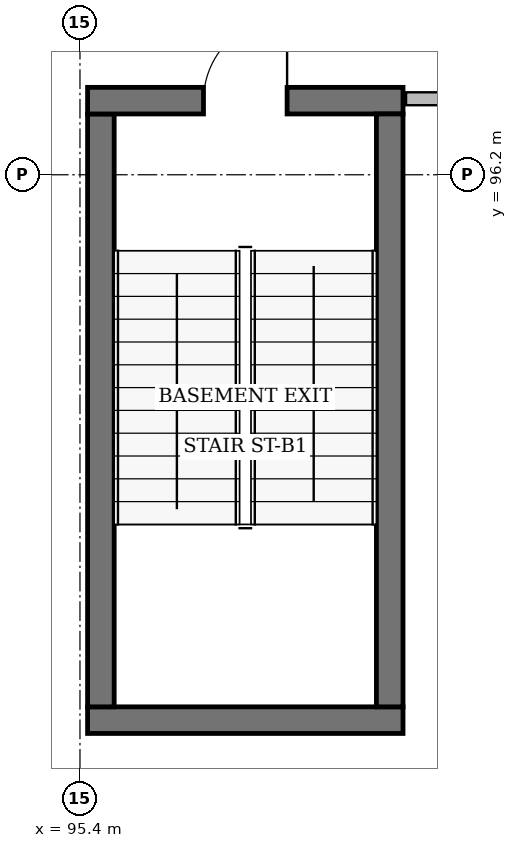
"""IFC4 building model, lengths in metres.
Left out: names, types, materials, properties, quantities, classifications, styles, units other than length and angle.
Written with IfcOpenShell. Run it as: python <this file> out.ifc"""

import sys

from ifc_helpers import new_model, si_unit, direction, frame, frame_2d, origin, place, context, subcontext, project, spatial, rectangle, extrude, element, fill, save


model = new_model("IFC4")
c1 = context("Model", 3, precision=1e-05, world=origin(), true_north=direction((0.0, 1.0)))
c2 = subcontext(c1, "Body", "Model", "MODEL_VIEW")
j1 = project(units=[si_unit("LENGTHUNIT", "METRE"), si_unit("PLANEANGLEUNIT", "RADIAN")], contexts=[c1])
p1 = place(None, origin())
s1 = spatial("IfcSite", under=j1, at=p1, CompositionType="ELEMENT")
p2 = place(p1, origin())
s2 = spatial("IfcBuilding", under=s1, at=p2, CompositionType="ELEMENT")
p3 = place(p2, frame((0.0, 0.0, -4.8)))
s3 = spatial("IfcBuildingStorey", under=s2, at=p3, CompositionType="ELEMENT", Elevation=-4.8)
p4 = place(p3, frame((99.65, 89.025, 0.0), z_axis=(0.0, 0.0, 1.0), x_axis=(-1.0, 0.0, 0.0)))
e1 = element("IfcWall", 1, at=p4, inside=s3, PredefinedType="SOLIDWALL", context=c2, shape_type="SweptSolid", body=[
    extrude(rectangle(XDim=4.15, YDim=0.35, at=frame_2d((2.075, 0.0))), origin(), (0.0, 0.0, 1.0), 4.56),
])
p5 = place(p3, frame((95.675, 89.2, 0.0), z_axis=(0.0, 0.0, 1.0), x_axis=(0.0, 1.0, 0.0)))
e2 = element("IfcWall", 2, at=p5, inside=s3, PredefinedType="SOLIDWALL", context=c2, shape_type="SweptSolid", body=[
    extrude(rectangle(XDim=7.8, YDim=0.35, at=frame_2d((3.9, 0.0))), origin(), (0.0, 0.0, 1.0), 4.56),
])
p6 = place(p3, frame((95.5, 97.175, 0.0), z_axis=(0.0, 0.0, 1.0), x_axis=(1.0, 0.0, 0.0)))
e3 = element("IfcWall", 3, at=p6, inside=s3, PredefinedType="SOLIDWALL", context=c2, shape_type="SweptSolid", body=[
    extrude(rectangle(XDim=4.15, YDim=0.35, at=frame_2d((2.075, 0.0))), origin(), (0.0, 0.0, 1.0), 4.56),
])
p7 = place(p6, frame((1.525, 0.0, 0.0)))
e4 = element("IfcOpeningElement", 4, at=p7, cuts=e3, PredefinedType="OPENING", context=c2, shape_type="SweptSolid", body=[
    extrude(rectangle(XDim=1.1, YDim=2.15, at=frame_2d((0.55, 1.075))), frame((0.0, 0.195, 0.0), z_axis=(0.0, -1.0, 0.0), x_axis=(1.0, 0.0, 0.0)), (0.0, 0.0, 1.0), 0.39),
])
p8 = place(p3, frame((99.475, 97.0, 0.0), z_axis=(0.0, 0.0, 1.0), x_axis=(0.0, -1.0, 0.0)))
e5 = element("IfcWall", 5, at=p8, inside=s3, PredefinedType="SOLIDWALL", context=c2, shape_type="SweptSolid", body=[
    extrude(rectangle(XDim=7.8, YDim=0.35, at=frame_2d((3.9, 0.0))), origin(), (0.0, 0.0, 1.0), 4.56),
])
p9 = place(p3, frame((99.69, 97.2, 0.0), z_axis=(0.0, 0.0, 1.0), x_axis=(1.0, 0.0, 0.0)))
e6 = element("IfcWall", 6, at=p9, inside=s3, PredefinedType="PARTITIONING", context=c2, shape_type="SweptSolid", body=[
    extrude(rectangle(XDim=9.91, YDim=0.17, at=frame_2d((4.955, 0.0))), origin(), (0.0, 0.0, 1.0), 4.48),
])
p10 = place(p9, frame((5.822, 0.0, 0.0)))
e7 = element("IfcOpeningElement", 7, at=p10, cuts=e6, PredefinedType="OPENING", context=c2, shape_type="SweptSolid", body=[
    extrude(rectangle(XDim=1.5, YDim=2.2, at=frame_2d((0.75, 1.1))), frame((0.0, 0.105, 0.0), z_axis=(0.0, -1.0, 0.0), x_axis=(1.0, 0.0, 0.0)), (0.0, 0.0, 1.0), 0.21),
])
p11 = place(p7, origin())
e8 = element("IfcDoor", 8, at=p11, inside=s3, OperationType="SINGLE_SWING_RIGHT", PredefinedType="DOOR", context=c2, shape_type="SweptSolid", body=[
    extrude(rectangle(XDim=1.1, YDim=2.15, at=frame_2d((0.55, 1.075))), frame((0.0, 0.025, 0.0), z_axis=(0.0, -1.0, 0.0), x_axis=(1.0, 0.0, 0.0)), (0.0, 0.0, 1.0), 0.05),
])
fill(e4, e8)
save(model, sys.argv[1])
